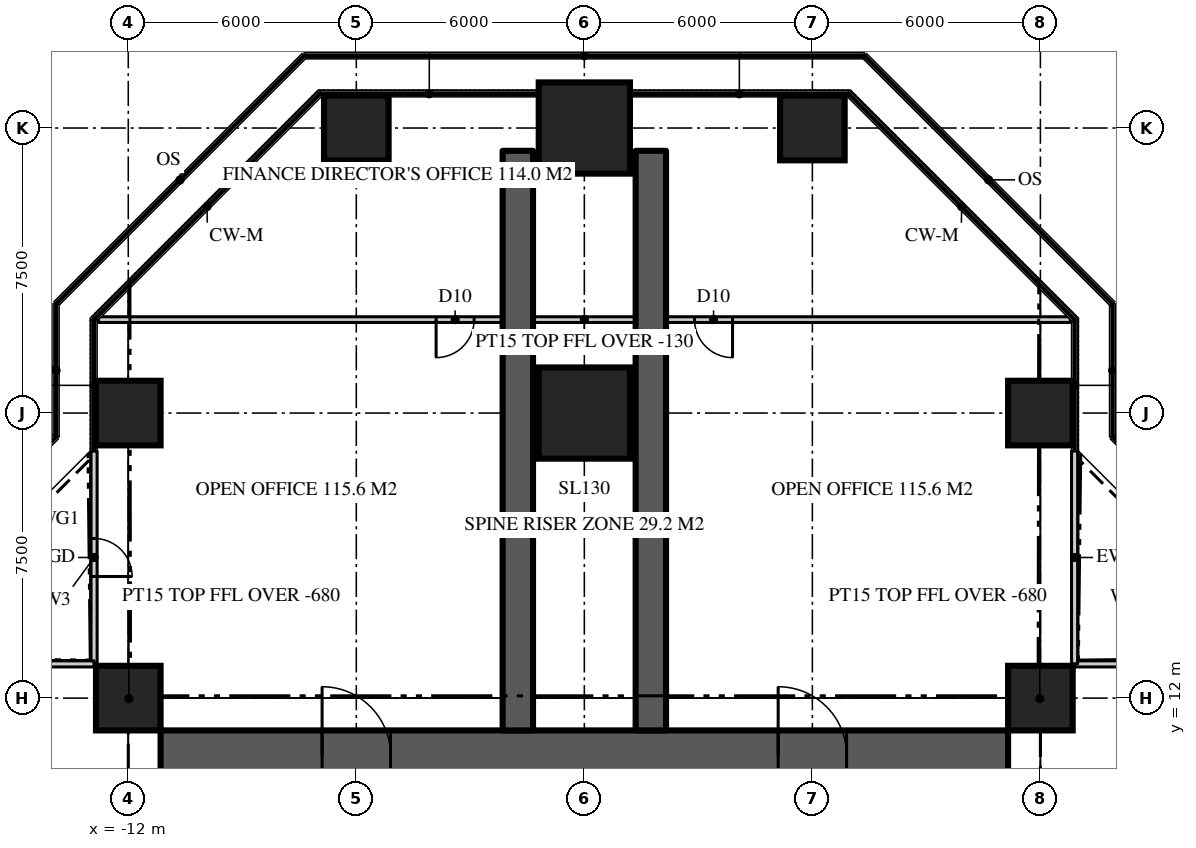
"""IFC4 building model, lengths in metres.
Left out: names, types, materials, properties, quantities, classifications, styles, units other than length and angle.
Written with IfcOpenShell. Run it as: python <this file> out.ifc"""

import sys

from ifc_helpers import new_model, si_unit, direction, frame, frame_2d, origin, origin_2d, place, context, subcontext, project, spatial, rectangle, extrude, element, fill, save


model = new_model("IFC4")
c1 = context("Model", 3, precision=1e-05, world=origin(), true_north=direction((0.0, 1.0)))
c2 = subcontext(c1, "Body", "Model", "MODEL_VIEW")
j1 = project(units=[si_unit("LENGTHUNIT", "METRE"), si_unit("PLANEANGLEUNIT", "RADIAN")], contexts=[c1])
p1 = place(None, origin())
s1 = spatial("IfcSite", under=j1, at=p1, CompositionType="ELEMENT")
p2 = place(p1, origin())
s2 = spatial("IfcBuilding", under=s1, at=p2, CompositionType="ELEMENT")
p3 = place(p2, frame((0.0, 0.0, 128.1)))
s3 = spatial("IfcBuildingStorey", under=s2, at=p3, CompositionType="ELEMENT", Elevation=128.1)
p4 = place(p3, frame((-11.15, 10.5, 0.0), z_axis=(0.0, 0.0, 1.0), x_axis=(1.0, 0.0, 0.0)))
e1 = element("IfcWall", 1, at=p4, inside=s3, PredefinedType="SHEAR", context=c2, shape_type="SweptSolid", body=[
    extrude(rectangle(XDim=22.3, YDim=1.3, at=frame_2d((11.15, 0.0))), origin(), (0.0, 0.0, 1.0), 3.9),
])
p5 = place(p4, frame((4.25, 0.0, 0.0)))
e2 = element("IfcOpeningElement", 2, at=p5, cuts=e1, PredefinedType="OPENING", context=c2, shape_type="SweptSolid", body=[
    extrude(rectangle(XDim=1.8, YDim=2.2, at=frame_2d((0.9, 1.1))), frame((0.0, 0.66, 0.0), z_axis=(0.0, -1.0, 0.0), x_axis=(1.0, 0.0, 0.0)), (0.0, 0.0, 1.0), 1.32),
])
p6 = place(p4, frame((16.25, 0.0, 0.0)))
e3 = element("IfcOpeningElement", 3, at=p6, cuts=e1, PredefinedType="OPENING", context=c2, shape_type="SweptSolid", body=[
    extrude(rectangle(XDim=1.8, YDim=2.2, at=frame_2d((0.9, 1.1))), frame((0.0, 0.66, 0.0), z_axis=(0.0, -1.0, 0.0), x_axis=(1.0, 0.0, 0.0)), (0.0, 0.0, 1.0), 1.32),
])
for number, where, z_axis, x_axis in (
    (4, (1.75, 11.15, 0.0), (0.0, 0.0, 1.0), (0.0, 1.0, 0.0)),
    (5, (-1.75, 11.15, 0.0), (0.0, 0.0, 1.0), (0.0, 1.0, 0.0)),
):
    element("IfcWall", number, at=place(p3, frame(where, z_axis=z_axis, x_axis=x_axis)), inside=s3, PredefinedType="SHEAR", context=c2, shape_type="SweptSolid", body=[
        extrude(rectangle(XDim=15.25, YDim=0.8, at=frame_2d((7.625, 0.0))), origin(), (0.0, 0.0, 1.0), 3.9),
    ])
for number, where, z_axis, x_axis in (
    (6, (-12.0, 12.0, 0.0), (0.0, 0.0, 1.0), (1.0, 0.0, 0.0)),
    (7, (12.0, 12.0, 0.0), (0.0, 0.0, 1.0), (1.0, 0.0, 0.0)),
    (8, (-12.0, 19.5, 0.0), (0.0, 0.0, 1.0), (1.0, 0.0, 0.0)),
):
    element("IfcColumn", number, at=place(p3, frame(where, z_axis=z_axis, x_axis=x_axis)), inside=s3, PredefinedType="COLUMN", context=c2, shape_type="SweptSolid", body=[
        extrude(rectangle(XDim=1.7, YDim=1.7, at=origin_2d()), origin(), (0.0, 0.0, 1.0), 3.9),
    ])
p7 = place(p3, frame((0.0, 19.5, 0.0), z_axis=(0.0, 0.0, 1.0), x_axis=(1.0, 0.0, 0.0)))
e9 = element("IfcColumn", 9, at=p7, inside=s3, PredefinedType="COLUMN", context=c2, shape_type="SweptSolid", body=[
    extrude(rectangle(XDim=2.4, YDim=2.4, at=origin_2d()), origin(), (0.0, 0.0, 1.0), 3.9),
])
for number, where, z_axis, x_axis in (
    (10, (12.0, 19.5, 0.0), (0.0, 0.0, 1.0), (1.0, 0.0, 0.0)),
    (11, (-6.0, 27.0, 0.0), (0.0, 0.0, 1.0), (1.0, 0.0, 0.0)),
):
    element("IfcColumn", number, at=place(p3, frame(where, z_axis=z_axis, x_axis=x_axis)), inside=s3, PredefinedType="COLUMN", context=c2, shape_type="SweptSolid", body=[
        extrude(rectangle(XDim=1.7, YDim=1.7, at=origin_2d()), origin(), (0.0, 0.0, 1.0), 3.9),
    ])
p8 = place(p3, frame((0.0, 27.0, 0.0), z_axis=(0.0, 0.0, 1.0), x_axis=(1.0, 0.0, 0.0)))
e12 = element("IfcColumn", 12, at=p8, inside=s3, PredefinedType="COLUMN", context=c2, shape_type="SweptSolid", body=[
    extrude(rectangle(XDim=2.4, YDim=2.4, at=origin_2d()), origin(), (0.0, 0.0, 1.0), 3.9),
])
p9 = place(p3, frame((6.0, 27.0, 0.0), z_axis=(0.0, 0.0, 1.0), x_axis=(1.0, 0.0, 0.0)))
e13 = element("IfcColumn", 13, at=p9, inside=s3, PredefinedType="COLUMN", context=c2, shape_type="SweptSolid", body=[
    extrude(rectangle(XDim=1.7, YDim=1.7, at=origin_2d()), origin(), (0.0, 0.0, 1.0), 3.9),
])
p10 = place(p3, frame((18.5, 12.9, 0.0), z_axis=(0.0, 0.0, 1.0), x_axis=(-1.0, 0.0, 0.0)))
e14 = element("IfcWall", 14, at=p10, inside=s3, PredefinedType="SOLIDWALL", context=c2, shape_type="SweptSolid", body=[
    extrude(rectangle(XDim=5.6, YDim=0.16, at=frame_2d((2.8, 0.0))), origin(), (0.0, 0.0, 1.0), 3.77),
])
p11 = place(p10, frame((2.3, 0.0, 0.0)))
e15 = element("IfcOpeningElement", 15, at=p11, cuts=e14, PredefinedType="OPENING", context=c2, shape_type="SweptSolid", body=[
    extrude(rectangle(XDim=1.0, YDim=2.2, at=frame_2d((0.5, 1.1))), frame((0.0, 0.09, 0.0), z_axis=(0.0, -1.0, 0.0), x_axis=(1.0, 0.0, 0.0)), (0.0, 0.0, 1.0), 0.18),
])
p12 = place(p3, frame((12.9, 12.9, 0.0), z_axis=(0.0, 0.0, 1.0), x_axis=(0.0, 1.0, 0.0)))
e16 = element("IfcWall", 16, at=p12, inside=s3, PredefinedType="SOLIDWALL", context=c2, shape_type="SweptSolid", body=[
    extrude(rectangle(XDim=5.6, YDim=0.16, at=frame_2d((2.8, 0.0))), origin(), (0.0, 0.0, 1.0), 3.77),
])
p13 = place(p3, frame((-12.9, 18.5, 0.0), z_axis=(0.0, 0.0, 1.0), x_axis=(0.0, -1.0, 0.0)))
e17 = element("IfcWall", 17, at=p13, inside=s3, PredefinedType="SOLIDWALL", context=c2, shape_type="SweptSolid", body=[
    extrude(rectangle(XDim=5.6, YDim=0.16, at=frame_2d((2.8, 0.0))), origin(), (0.0, 0.0, 1.0), 3.77),
])
p14 = place(p13, frame((2.3, 0.0, 0.0)))
e18 = element("IfcOpeningElement", 18, at=p14, cuts=e17, PredefinedType="OPENING", context=c2, shape_type="SweptSolid", body=[
    extrude(rectangle(XDim=1.0, YDim=2.2, at=frame_2d((0.5, 1.1))), frame((0.0, 0.09, 0.0), z_axis=(0.0, -1.0, 0.0), x_axis=(1.0, 0.0, 0.0)), (0.0, 0.0, 1.0), 0.18),
])
p15 = place(p3, frame((-12.9, 12.9, 0.0), z_axis=(0.0, 0.0, 1.0), x_axis=(-1.0, 0.0, 0.0)))
e19 = element("IfcWall", 19, at=p15, inside=s3, PredefinedType="SOLIDWALL", context=c2, shape_type="SweptSolid", body=[
    extrude(rectangle(XDim=5.6, YDim=0.16, at=frame_2d((2.8, 0.0))), origin(), (0.0, 0.0, 1.0), 3.77),
])
p16 = place(p3, frame((12.786, 21.959, 0.0), z_axis=(0.0, 0.0, 1.0), x_axis=(-1.0, 0.0, 0.0)))
e20 = element("IfcWall", 20, at=p16, inside=s3, PredefinedType="PARTITIONING", context=c2, shape_type="SweptSolid", body=[
    extrude(rectangle(XDim=25.573, YDim=0.15, at=frame_2d((12.786, 0.0))), origin(), (0.0, 0.0, 1.0), 3.77),
])
p17 = place(p16, frame((15.687, 0.0, 0.0)))
e21 = element("IfcOpeningElement", 21, at=p17, cuts=e20, PredefinedType="OPENING", context=c2, shape_type="SweptSolid", body=[
    extrude(rectangle(XDim=1.0, YDim=2.2, at=frame_2d((0.5, 1.1))), frame((0.0, 0.085, 0.0), z_axis=(0.0, -1.0, 0.0), x_axis=(1.0, 0.0, 0.0)), (0.0, 0.0, 1.0), 0.17),
])
p18 = place(p16, frame((8.886, 0.0, 0.0)))
e22 = element("IfcOpeningElement", 22, at=p18, cuts=e20, PredefinedType="OPENING", context=c2, shape_type="SweptSolid", body=[
    extrude(rectangle(XDim=1.0, YDim=2.2, at=frame_2d((0.5, 1.1))), frame((0.0, 0.085, 0.0), z_axis=(0.0, -1.0, 0.0), x_axis=(1.0, 0.0, 0.0)), (0.0, 0.0, 1.0), 0.17),
])
for number, where, z_axis, x_axis in (
    (23, (11.15, 11.15, 0.0), (0.0, 0.0, 1.0), (0.707, 0.707, 0.0)),
    (24, (-11.15, 11.15, 0.0), (0.0, 0.0, 1.0), (-0.707, 0.707, 0.0)),
):
    element("IfcWall", number, at=place(p3, frame(where, z_axis=z_axis, x_axis=x_axis)), inside=s3, PredefinedType="PARTITIONING", context=c2, shape_type="SweptSolid", body=[
        extrude(rectangle(XDim=2.362, YDim=0.15, at=frame_2d((1.181, 0.0))), origin(), (0.0, 0.0, 1.0), 3.22),
    ])
p19 = place(p14, origin())
e25 = element("IfcDoor", 25, at=p19, inside=s3, OperationType="SINGLE_SWING_RIGHT", PredefinedType="DOOR", context=c2, shape_type="SweptSolid", body=[
    extrude(rectangle(XDim=1.0, YDim=2.2, at=frame_2d((0.5, 1.1))), frame((0.0, 0.025, 0.0), z_axis=(0.0, -1.0, 0.0), x_axis=(1.0, 0.0, 0.0)), (0.0, 0.0, 1.0), 0.05),
])
fill(e18, e25)
p20 = place(p5, origin())
e26 = element("IfcDoor", 26, at=p20, inside=s3, OperationType="DOUBLE_DOOR_DOUBLE_SWING", PredefinedType="DOOR", context=c2, shape_type="SweptSolid", body=[
    extrude(rectangle(XDim=1.8, YDim=2.2, at=frame_2d((0.9, 1.1))), frame((0.0, 0.025, 0.0), z_axis=(0.0, -1.0, 0.0), x_axis=(1.0, 0.0, 0.0)), (0.0, 0.0, 1.0), 0.05),
])
fill(e2, e26)
p21 = place(p6, origin())
e27 = element("IfcDoor", 27, at=p21, inside=s3, OperationType="DOUBLE_DOOR_DOUBLE_SWING", PredefinedType="DOOR", context=c2, shape_type="SweptSolid", body=[
    extrude(rectangle(XDim=1.8, YDim=2.2, at=frame_2d((0.9, 1.1))), frame((0.0, 0.025, 0.0), z_axis=(0.0, -1.0, 0.0), x_axis=(1.0, 0.0, 0.0)), (0.0, 0.0, 1.0), 0.05),
])
fill(e3, e27)
p22 = place(p17, origin())
e28 = element("IfcDoor", 28, at=p22, inside=s3, OperationType="SINGLE_SWING_RIGHT", PredefinedType="DOOR", context=c2, shape_type="SweptSolid", body=[
    extrude(rectangle(XDim=1.0, YDim=2.2, at=frame_2d((0.5, 1.1))), frame((0.0, 0.025, 0.0), z_axis=(0.0, -1.0, 0.0), x_axis=(1.0, 0.0, 0.0)), (0.0, 0.0, 1.0), 0.05),
])
fill(e21, e28)
p23 = place(p18, origin())
e29 = element("IfcDoor", 29, at=p23, inside=s3, OperationType="SINGLE_SWING_LEFT", PredefinedType="DOOR", context=c2, shape_type="SweptSolid", body=[
    extrude(rectangle(XDim=1.0, YDim=2.2, at=frame_2d((0.5, 1.1))), frame((0.0, 0.025, 0.0), z_axis=(0.0, -1.0, 0.0), x_axis=(1.0, 0.0, 0.0)), (0.0, 0.0, 1.0), 0.05),
])
fill(e22, e29)
save(model, sys.argv[1])
